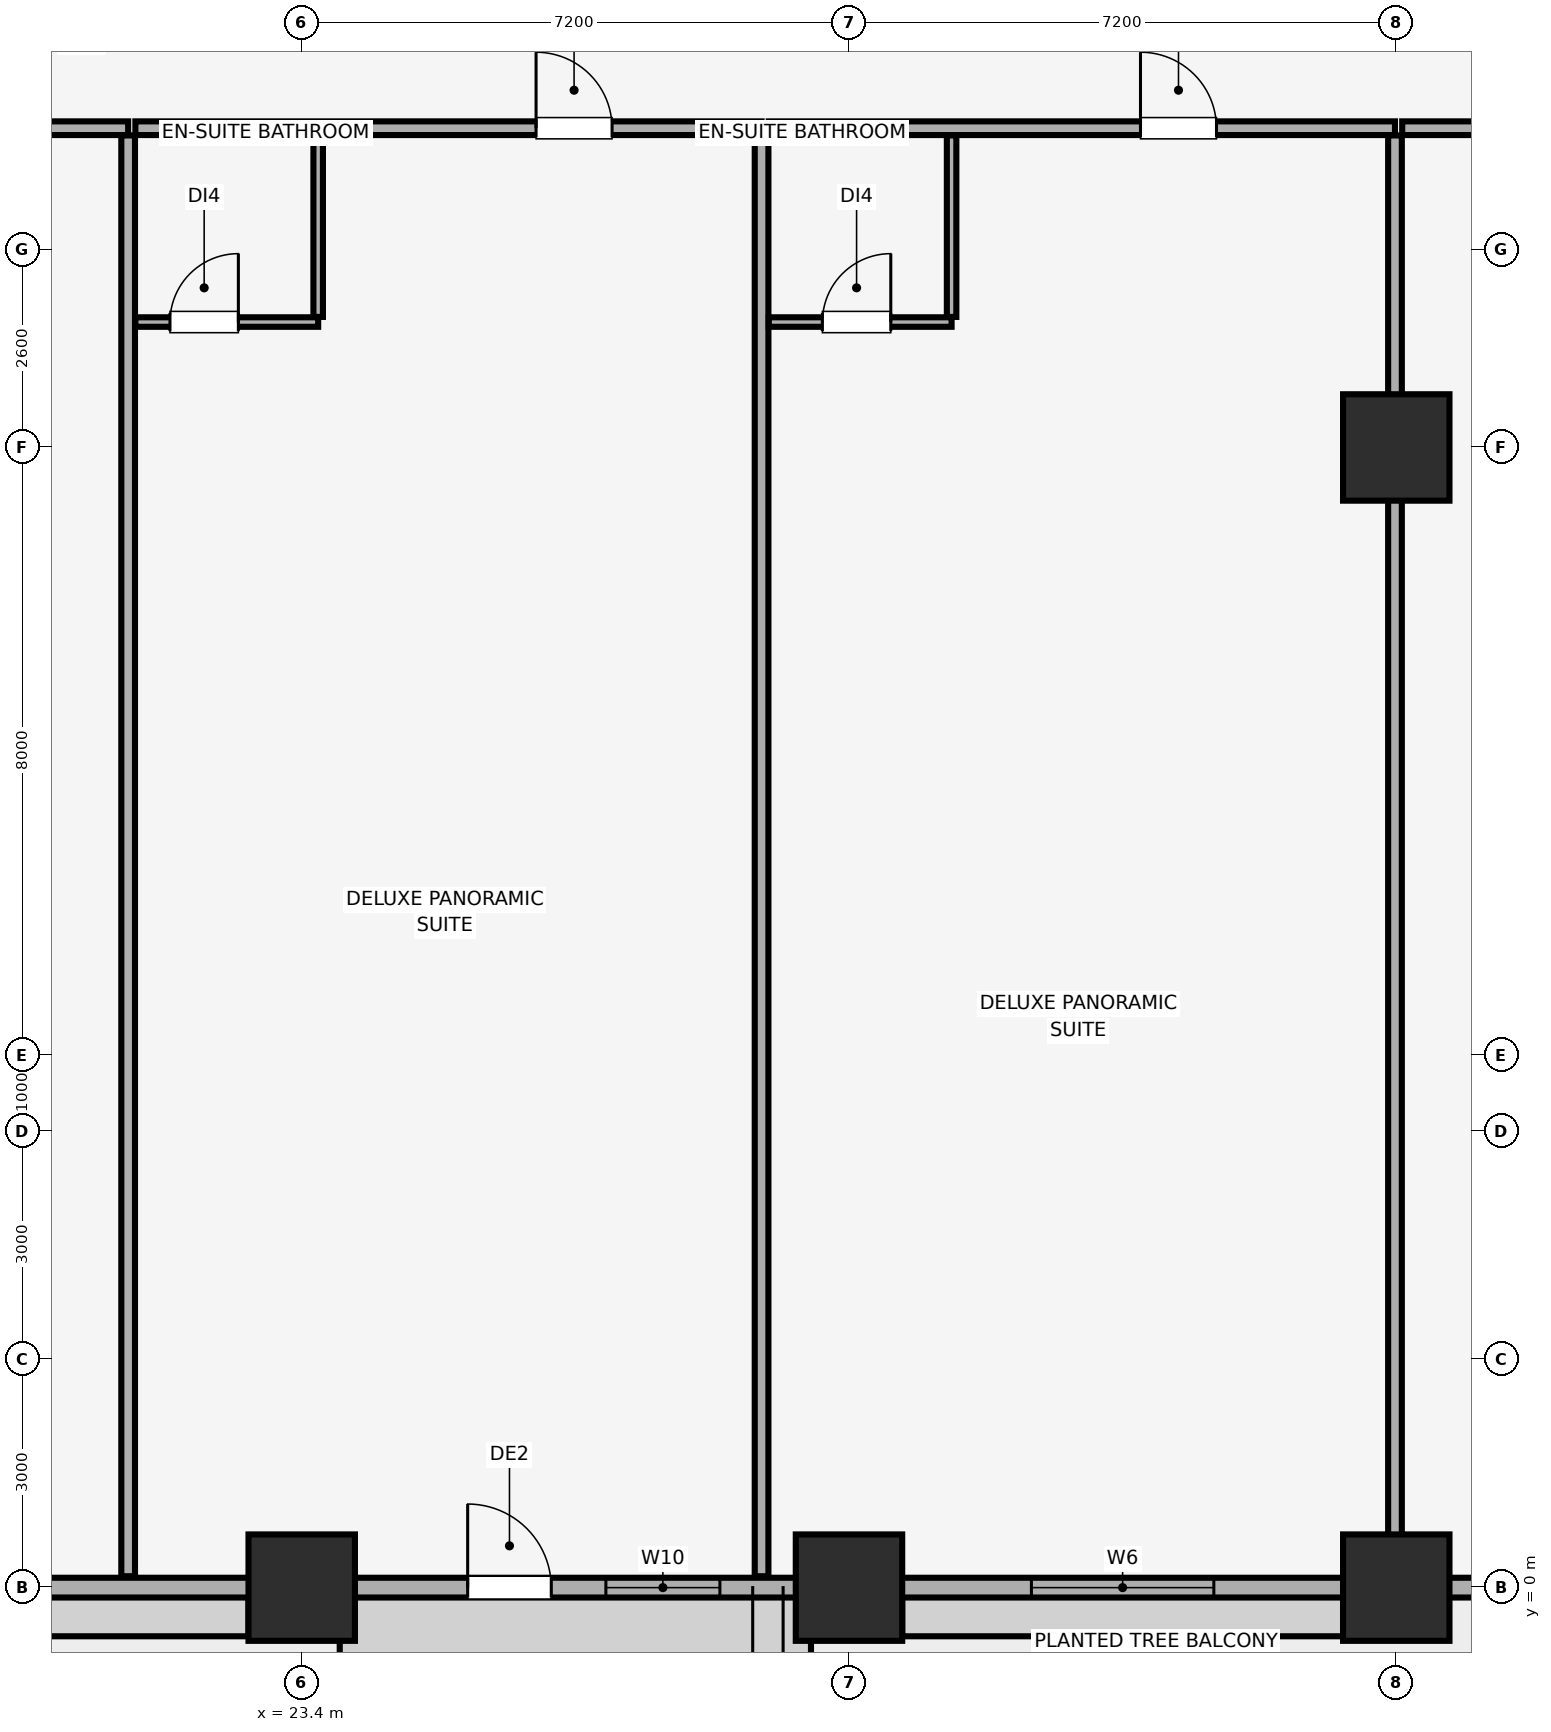
"""IFC4 building model, lengths in metres.
Left out: names, types, materials, properties, quantities, classifications, styles, units other than length and angle.
Written with IfcOpenShell. Run it as: python <this file> out.ifc"""

import sys

from ifc_helpers import new_model, si_unit, direction, frame, frame_2d, origin, origin_2d, place, context, subcontext, project, spatial, rectangle, extrude, element, fill, save


model = new_model("IFC4")
c1 = context("Model", 3, precision=1e-05, world=origin(), true_north=direction((0.0, 1.0)))
c2 = subcontext(c1, "Body", "Model", "MODEL_VIEW")
j1 = project(units=[si_unit("LENGTHUNIT", "METRE"), si_unit("PLANEANGLEUNIT", "RADIAN")], contexts=[c1])
p1 = place(None, origin())
s1 = spatial("IfcSite", under=j1, at=p1, CompositionType="ELEMENT")
p2 = place(p1, origin())
s2 = spatial("IfcBuilding", under=s1, at=p2, CompositionType="ELEMENT")
p3 = place(p2, frame((0.0, 0.0, 72.65)))
s3 = spatial("IfcBuildingStorey", under=s2, at=p3, CompositionType="ELEMENT", Elevation=72.65)
for number, where, z_axis, x_axis in (
    (1, (23.4, 0.0, 0.0), (0.0, 0.0, 1.0), (1.0, 0.0, 0.0)),
    (2, (30.6, 0.0, 0.0), (0.0, 0.0, 1.0), (1.0, 0.0, 0.0)),
    (3, (37.8, 0.0, 0.0), (0.0, 0.0, 1.0), (1.0, 0.0, 0.0)),
    (4, (37.8, 15.0, 0.0), (0.0, 0.0, 1.0), (1.0, 0.0, 0.0)),
):
    element("IfcColumn", number, at=place(p3, frame(where, z_axis=z_axis, x_axis=x_axis)), inside=s3, PredefinedType="COLUMN", context=c2, shape_type="SweptSolid", body=[
        extrude(rectangle(XDim=1.4, YDim=1.4, at=origin_2d()), origin(), (0.0, 0.0, 1.0), 3.51),
    ])
p4 = place(p3, frame((4.2, 0.0, 0.0), z_axis=(0.0, 0.0, 1.0), x_axis=(1.0, 0.0, 0.0)))
e5 = element("IfcWall", 5, at=p4, inside=s3, PredefinedType="SOLIDWALL", context=c2, shape_type="SweptSolid", body=[
    extrude(rectangle(XDim=75.6, YDim=0.26, at=frame_2d((37.8, 0.0))), origin(), (0.0, 0.0, 1.0), 2.56),
])
p5 = place(p4, frame((21.383, 0.0, 0.0)))
e6 = element("IfcOpeningElement", 6, at=p5, cuts=e5, PredefinedType="OPENING", context=c2, shape_type="SweptSolid", body=[
    extrude(rectangle(XDim=1.1, YDim=2.15, at=frame_2d((0.55, 1.075))), frame((0.0, 0.14, 0.0), z_axis=(0.0, -1.0, 0.0), x_axis=(1.0, 0.0, 0.0)), (0.0, 0.0, 1.0), 0.28),
])
p6 = place(p4, frame((37.25, 0.0, 0.0)))
e7 = element("IfcOpeningElement", 7, at=p6, cuts=e5, PredefinedType="OPENING", context=c2, shape_type="SweptSolid", body=[
    extrude(rectangle(XDim=1.1, YDim=2.15, at=frame_2d((0.55, 1.075))), frame((0.0, 0.14, 0.0), z_axis=(0.0, -1.0, 0.0), x_axis=(1.0, 0.0, 0.0)), (0.0, 0.0, 1.0), 0.28),
])
p7 = place(p4, frame((53.117, 0.0, 0.0)))
e8 = element("IfcOpeningElement", 8, at=p7, cuts=e5, PredefinedType="OPENING", context=c2, shape_type="SweptSolid", body=[
    extrude(rectangle(XDim=1.1, YDim=2.15, at=frame_2d((0.55, 1.075))), frame((0.0, 0.14, 0.0), z_axis=(0.0, -1.0, 0.0), x_axis=(1.0, 0.0, 0.0)), (0.0, 0.0, 1.0), 0.28),
])
p8 = place(p4, frame((1.035, 0.0, 0.85)))
e9 = element("IfcOpeningElement", 9, at=p8, cuts=e5, PredefinedType="OPENING", context=c2, shape_type="SweptSolid", body=[
    extrude(rectangle(XDim=2.4, YDim=1.5, at=frame_2d((1.2, 0.75))), frame((0.0, 0.14, 0.0), z_axis=(0.0, -1.0, 0.0), x_axis=(1.0, 0.0, 0.0)), (0.0, 0.0, 1.0), 0.28),
])
p9 = place(p4, frame((5.691, 0.0, 0.85)))
e10 = element("IfcOpeningElement", 10, at=p9, cuts=e5, PredefinedType="OPENING", context=c2, shape_type="SweptSolid", body=[
    extrude(rectangle(XDim=2.4, YDim=1.5, at=frame_2d((1.2, 0.75))), frame((0.0, 0.14, 0.0), z_axis=(0.0, -1.0, 0.0), x_axis=(1.0, 0.0, 0.0)), (0.0, 0.0, 1.0), 0.28),
])
p10 = place(p4, frame((9.342, 0.0, 0.85)))
e11 = element("IfcOpeningElement", 11, at=p10, cuts=e5, PredefinedType="OPENING", context=c2, shape_type="SweptSolid", body=[
    extrude(rectangle(XDim=1.5, YDim=1.4, at=frame_2d((0.75, 0.7))), frame((0.0, 0.14, 0.0), z_axis=(0.0, -1.0, 0.0), x_axis=(1.0, 0.0, 0.0)), (0.0, 0.0, 1.0), 0.28),
])
p11 = place(p4, frame((13.458, 0.0, 0.85)))
e12 = element("IfcOpeningElement", 12, at=p11, cuts=e5, PredefinedType="OPENING", context=c2, shape_type="SweptSolid", body=[
    extrude(rectangle(XDim=2.4, YDim=1.5, at=frame_2d((1.2, 0.75))), frame((0.0, 0.14, 0.0), z_axis=(0.0, -1.0, 0.0), x_axis=(1.0, 0.0, 0.0)), (0.0, 0.0, 1.0), 0.28),
])
p12 = place(p4, frame((23.202, 0.0, 0.85)))
e13 = element("IfcOpeningElement", 13, at=p12, cuts=e5, PredefinedType="OPENING", context=c2, shape_type="SweptSolid", body=[
    extrude(rectangle(XDim=1.5, YDim=1.4, at=frame_2d((0.75, 0.7))), frame((0.0, 0.14, 0.0), z_axis=(0.0, -1.0, 0.0), x_axis=(1.0, 0.0, 0.0)), (0.0, 0.0, 1.0), 0.28),
])
p13 = place(p4, frame((28.8, 0.0, 0.85)))
e14 = element("IfcOpeningElement", 14, at=p13, cuts=e5, PredefinedType="OPENING", context=c2, shape_type="SweptSolid", body=[
    extrude(rectangle(XDim=2.4, YDim=1.5, at=frame_2d((1.2, 0.75))), frame((0.0, 0.14, 0.0), z_axis=(0.0, -1.0, 0.0), x_axis=(1.0, 0.0, 0.0)), (0.0, 0.0, 1.0), 0.28),
])
p14 = place(p4, frame((34.79, 0.0, 0.85)))
e15 = element("IfcOpeningElement", 15, at=p14, cuts=e5, PredefinedType="OPENING", context=c2, shape_type="SweptSolid", body=[
    extrude(rectangle(XDim=1.5, YDim=1.4, at=frame_2d((0.75, 0.7))), frame((0.0, 0.14, 0.0), z_axis=(0.0, -1.0, 0.0), x_axis=(1.0, 0.0, 0.0)), (0.0, 0.0, 1.0), 0.28),
])
p15 = place(p4, frame((39.31, 0.0, 0.85)))
e16 = element("IfcOpeningElement", 16, at=p15, cuts=e5, PredefinedType="OPENING", context=c2, shape_type="SweptSolid", body=[
    extrude(rectangle(XDim=1.5, YDim=1.4, at=frame_2d((0.75, 0.7))), frame((0.0, 0.14, 0.0), z_axis=(0.0, -1.0, 0.0), x_axis=(1.0, 0.0, 0.0)), (0.0, 0.0, 1.0), 0.28),
])
p16 = place(p4, frame((44.4, 0.0, 0.85)))
e17 = element("IfcOpeningElement", 17, at=p16, cuts=e5, PredefinedType="OPENING", context=c2, shape_type="SweptSolid", body=[
    extrude(rectangle(XDim=2.4, YDim=1.5, at=frame_2d((1.2, 0.75))), frame((0.0, 0.14, 0.0), z_axis=(0.0, -1.0, 0.0), x_axis=(1.0, 0.0, 0.0)), (0.0, 0.0, 1.0), 0.28),
])
p17 = place(p4, frame((50.848, 0.0, 0.85)))
e18 = element("IfcOpeningElement", 18, at=p17, cuts=e5, PredefinedType="OPENING", context=c2, shape_type="SweptSolid", body=[
    extrude(rectangle(XDim=1.5, YDim=1.4, at=frame_2d((0.75, 0.7))), frame((0.0, 0.14, 0.0), z_axis=(0.0, -1.0, 0.0), x_axis=(1.0, 0.0, 0.0)), (0.0, 0.0, 1.0), 0.28),
])
p18 = place(p4, frame((59.691, 0.0, 0.85)))
e19 = element("IfcOpeningElement", 19, at=p18, cuts=e5, PredefinedType="OPENING", context=c2, shape_type="SweptSolid", body=[
    extrude(rectangle(XDim=2.4, YDim=1.5, at=frame_2d((1.2, 0.75))), frame((0.0, 0.14, 0.0), z_axis=(0.0, -1.0, 0.0), x_axis=(1.0, 0.0, 0.0)), (0.0, 0.0, 1.0), 0.28),
])
p19 = place(p4, frame((64.708, 0.0, 0.85)))
e20 = element("IfcOpeningElement", 20, at=p19, cuts=e5, PredefinedType="OPENING", context=c2, shape_type="SweptSolid", body=[
    extrude(rectangle(XDim=1.5, YDim=1.4, at=frame_2d((0.75, 0.7))), frame((0.0, 0.14, 0.0), z_axis=(0.0, -1.0, 0.0), x_axis=(1.0, 0.0, 0.0)), (0.0, 0.0, 1.0), 0.28),
])
p20 = place(p4, frame((67.458, 0.0, 0.85)))
e21 = element("IfcOpeningElement", 21, at=p20, cuts=e5, PredefinedType="OPENING", context=c2, shape_type="SweptSolid", body=[
    extrude(rectangle(XDim=2.4, YDim=1.5, at=frame_2d((1.2, 0.75))), frame((0.0, 0.14, 0.0), z_axis=(0.0, -1.0, 0.0), x_axis=(1.0, 0.0, 0.0)), (0.0, 0.0, 1.0), 0.28),
])
p21 = place(p4, frame((72.165, 0.0, 0.85)))
e22 = element("IfcOpeningElement", 22, at=p21, cuts=e5, PredefinedType="OPENING", context=c2, shape_type="SweptSolid", body=[
    extrude(rectangle(XDim=2.4, YDim=1.5, at=frame_2d((1.2, 0.75))), frame((0.0, 0.14, 0.0), z_axis=(0.0, -1.0, 0.0), x_axis=(1.0, 0.0, 0.0)), (0.0, 0.0, 1.0), 0.28),
])
p22 = place(p3, frame((12.878, 19.2, 0.0), z_axis=(0.0, 0.0, 1.0), x_axis=(1.0, 0.0, 0.0)))
e23 = element("IfcWall", 23, at=p22, inside=s3, PredefinedType="PARTITIONING", context=c2, shape_type="SweptSolid", body=[
    extrude(rectangle(XDim=8.238, YDim=0.18, at=frame_2d((4.119, 0.0))), origin(), (0.0, 0.0, 1.0), 3.51),
])
p23 = place(p22, frame((5.67, 0.0, 0.0)))
e24 = element("IfcOpeningElement", 24, at=p23, cuts=e23, PredefinedType="OPENING", context=c2, shape_type="SweptSolid", body=[
    extrude(rectangle(XDim=1.0, YDim=2.15, at=frame_2d((0.5, 1.075))), frame((0.0, 0.1, 0.0), z_axis=(0.0, -1.0, 0.0), x_axis=(1.0, 0.0, 0.0)), (0.0, 0.0, 1.0), 0.2),
])
p24 = place(p3, frame((21.117, 0.15, 0.0), z_axis=(0.0, 0.0, 1.0), x_axis=(0.0, 1.0, 0.0)))
e25 = element("IfcWall", 25, at=p24, inside=s3, PredefinedType="PARTITIONING", context=c2, shape_type="SweptSolid", body=[
    extrude(rectangle(XDim=18.955, YDim=0.18, at=frame_2d((9.478, 0.0))), origin(), (0.0, 0.0, 1.0), 3.51),
])
p25 = place(p3, frame((21.212, 19.2, 0.0), z_axis=(0.0, 0.0, 1.0), x_axis=(1.0, 0.0, 0.0)))
e26 = element("IfcWall", 26, at=p25, inside=s3, PredefinedType="PARTITIONING", context=c2, shape_type="SweptSolid", body=[
    extrude(rectangle(XDim=8.238, YDim=0.18, at=frame_2d((4.119, 0.0))), origin(), (0.0, 0.0, 1.0), 3.51),
])
p26 = place(p25, frame((5.271, 0.0, 0.0)))
e27 = element("IfcOpeningElement", 27, at=p26, cuts=e26, PredefinedType="OPENING", context=c2, shape_type="SweptSolid", body=[
    extrude(rectangle(XDim=1.0, YDim=2.15, at=frame_2d((0.5, 1.075))), frame((0.0, 0.1, 0.0), z_axis=(0.0, -1.0, 0.0), x_axis=(1.0, 0.0, 0.0)), (0.0, 0.0, 1.0), 0.2),
])
p27 = place(p3, frame((29.45, 0.15, 0.0), z_axis=(0.0, 0.0, 1.0), x_axis=(0.0, 1.0, 0.0)))
e28 = element("IfcWall", 28, at=p27, inside=s3, PredefinedType="PARTITIONING", context=c2, shape_type="SweptSolid", body=[
    extrude(rectangle(XDim=18.955, YDim=0.18, at=frame_2d((9.478, 0.0))), origin(), (0.0, 0.0, 1.0), 3.51),
])
p28 = place(p3, frame((21.212, 16.65, 0.0), z_axis=(0.0, 0.0, 1.0), x_axis=(1.0, 0.0, 0.0)))
e29 = element("IfcWall", 29, at=p28, inside=s3, PredefinedType="PARTITIONING", context=c2, shape_type="SweptSolid", body=[
    extrude(rectangle(XDim=2.405, YDim=0.125, at=frame_2d((1.203, 0.0))), origin(), (0.0, 0.0, 1.0), 3.51),
])
p29 = place(p28, frame((0.455, 0.0, 0.0)))
e30 = element("IfcOpeningElement", 30, at=p29, cuts=e29, PredefinedType="OPENING", context=c2, shape_type="SweptSolid", body=[
    extrude(rectangle(XDim=0.9, YDim=2.1, at=frame_2d((0.45, 1.05))), frame((0.0, 0.073, 0.0), z_axis=(0.0, -1.0, 0.0), x_axis=(1.0, 0.0, 0.0)), (0.0, 0.0, 1.0), 0.145),
])
p30 = place(p3, frame((23.617, 16.718, 0.0), z_axis=(0.0, 0.0, 1.0), x_axis=(0.0, 1.0, 0.0)))
e31 = element("IfcWall", 31, at=p30, inside=s3, PredefinedType="PARTITIONING", context=c2, shape_type="SweptSolid", body=[
    extrude(rectangle(XDim=2.387, YDim=0.125, at=frame_2d((1.194, 0.0))), origin(), (0.0, 0.0, 1.0), 2.977),
])
p31 = place(p3, frame((29.545, 19.2, 0.0), z_axis=(0.0, 0.0, 1.0), x_axis=(1.0, 0.0, 0.0)))
e32 = element("IfcWall", 32, at=p31, inside=s3, PredefinedType="PARTITIONING", context=c2, shape_type="SweptSolid", body=[
    extrude(rectangle(XDim=8.238, YDim=0.18, at=frame_2d((4.119, 0.0))), origin(), (0.0, 0.0, 1.0), 3.51),
])
p32 = place(p31, frame((4.89, 0.0, 0.0)))
e33 = element("IfcOpeningElement", 33, at=p32, cuts=e32, PredefinedType="OPENING", context=c2, shape_type="SweptSolid", body=[
    extrude(rectangle(XDim=1.0, YDim=2.15, at=frame_2d((0.5, 1.075))), frame((0.0, 0.1, 0.0), z_axis=(0.0, -1.0, 0.0), x_axis=(1.0, 0.0, 0.0)), (0.0, 0.0, 1.0), 0.2),
])
p33 = place(p3, frame((37.783, 0.15, 0.0), z_axis=(0.0, 0.0, 1.0), x_axis=(0.0, 1.0, 0.0)))
e34 = element("IfcWall", 34, at=p33, inside=s3, PredefinedType="PARTITIONING", context=c2, shape_type="SweptSolid", body=[
    extrude(rectangle(XDim=18.955, YDim=0.18, at=frame_2d((9.478, 0.0))), origin(), (0.0, 0.0, 1.0), 2.898),
])
p34 = place(p3, frame((29.545, 16.65, 0.0), z_axis=(0.0, 0.0, 1.0), x_axis=(1.0, 0.0, 0.0)))
e35 = element("IfcWall", 35, at=p34, inside=s3, PredefinedType="PARTITIONING", context=c2, shape_type="SweptSolid", body=[
    extrude(rectangle(XDim=2.405, YDim=0.125, at=frame_2d((1.203, 0.0))), origin(), (0.0, 0.0, 1.0), 3.51),
])
p35 = place(p34, frame((0.705, 0.0, 0.0)))
e36 = element("IfcOpeningElement", 36, at=p35, cuts=e35, PredefinedType="OPENING", context=c2, shape_type="SweptSolid", body=[
    extrude(rectangle(XDim=0.9, YDim=2.1, at=frame_2d((0.45, 1.05))), frame((0.0, 0.073, 0.0), z_axis=(0.0, -1.0, 0.0), x_axis=(1.0, 0.0, 0.0)), (0.0, 0.0, 1.0), 0.145),
])
p36 = place(p3, frame((31.95, 16.718, 0.0), z_axis=(0.0, 0.0, 1.0), x_axis=(0.0, 1.0, 0.0)))
e37 = element("IfcWall", 37, at=p36, inside=s3, PredefinedType="PARTITIONING", context=c2, shape_type="SweptSolid", body=[
    extrude(rectangle(XDim=2.387, YDim=0.125, at=frame_2d((1.194, 0.0))), origin(), (0.0, 0.0, 1.0), 3.51),
])
p37 = place(p3, frame((37.878, 19.2, 0.0), z_axis=(0.0, 0.0, 1.0), x_axis=(1.0, 0.0, 0.0)))
e38 = element("IfcWall", 38, at=p37, inside=s3, PredefinedType="PARTITIONING", context=c2, shape_type="SweptSolid", body=[
    extrude(rectangle(XDim=8.238, YDim=0.18, at=frame_2d((4.119, 0.0))), origin(), (0.0, 0.0, 1.0), 3.51),
])
p38 = place(p37, frame((2.27, 0.0, 0.0)))
e39 = element("IfcOpeningElement", 39, at=p38, cuts=e38, PredefinedType="OPENING", context=c2, shape_type="SweptSolid", body=[
    extrude(rectangle(XDim=1.0, YDim=2.15, at=frame_2d((0.5, 1.075))), frame((0.0, 0.1, 0.0), z_axis=(0.0, -1.0, 0.0), x_axis=(1.0, 0.0, 0.0)), (0.0, 0.0, 1.0), 0.2),
])
p39 = place(p5, origin())
e40 = element("IfcDoor", 40, at=p39, inside=s3, OperationType="SINGLE_SWING_LEFT", PredefinedType="DOOR", context=c2, shape_type="SweptSolid", body=[
    extrude(rectangle(XDim=1.1, YDim=2.15, at=frame_2d((0.55, 1.075))), frame((0.0, 0.025, 0.0), z_axis=(0.0, -1.0, 0.0), x_axis=(1.0, 0.0, 0.0)), (0.0, 0.0, 1.0), 0.05),
])
fill(e6, e40)
p40 = place(p12, origin())
e41 = element("IfcWindow", 41, at=p40, inside=s3, PartitioningType="SINGLE_PANEL", PredefinedType="WINDOW", context=c2, shape_type="SweptSolid", body=[
    extrude(rectangle(XDim=1.5, YDim=1.4, at=frame_2d((0.75, 0.7))), frame((0.0, 0.03, 0.0), z_axis=(0.0, -1.0, 0.0), x_axis=(1.0, 0.0, 0.0)), (0.0, 0.0, 1.0), 0.06),
])
fill(e13, e41)
p41 = place(p13, origin())
e42 = element("IfcWindow", 42, at=p41, inside=s3, PartitioningType="SINGLE_PANEL", PredefinedType="WINDOW", context=c2, shape_type="SweptSolid", body=[
    extrude(rectangle(XDim=2.4, YDim=1.5, at=frame_2d((1.2, 0.75))), frame((0.0, 0.03, 0.0), z_axis=(0.0, -1.0, 0.0), x_axis=(1.0, 0.0, 0.0)), (0.0, 0.0, 1.0), 0.06),
])
fill(e14, e42)
p42 = place(p26, origin())
e43 = element("IfcDoor", 43, at=p42, inside=s3, OperationType="SINGLE_SWING_LEFT", PredefinedType="DOOR", context=c2, shape_type="SweptSolid", body=[
    extrude(rectangle(XDim=1.0, YDim=2.15, at=frame_2d((0.5, 1.075))), frame((0.0, 0.025, 0.0), z_axis=(0.0, -1.0, 0.0), x_axis=(1.0, 0.0, 0.0)), (0.0, 0.0, 1.0), 0.05),
])
fill(e27, e43)
p43 = place(p29, origin())
e44 = element("IfcDoor", 44, at=p43, inside=s3, OperationType="SINGLE_SWING_RIGHT", PredefinedType="DOOR", context=c2, shape_type="SweptSolid", body=[
    extrude(rectangle(XDim=0.9, YDim=2.1, at=frame_2d((0.45, 1.05))), frame((0.0, 0.025, 0.0), z_axis=(0.0, -1.0, 0.0), x_axis=(1.0, 0.0, 0.0)), (0.0, 0.0, 1.0), 0.05),
])
fill(e30, e44)
p44 = place(p32, origin())
e45 = element("IfcDoor", 45, at=p44, inside=s3, OperationType="SINGLE_SWING_LEFT", PredefinedType="DOOR", context=c2, shape_type="SweptSolid", body=[
    extrude(rectangle(XDim=1.0, YDim=2.15, at=frame_2d((0.5, 1.075))), frame((0.0, 0.025, 0.0), z_axis=(0.0, -1.0, 0.0), x_axis=(1.0, 0.0, 0.0)), (0.0, 0.0, 1.0), 0.05),
])
fill(e33, e45)
p45 = place(p35, origin())
e46 = element("IfcDoor", 46, at=p45, inside=s3, OperationType="SINGLE_SWING_RIGHT", PredefinedType="DOOR", context=c2, shape_type="SweptSolid", body=[
    extrude(rectangle(XDim=0.9, YDim=2.1, at=frame_2d((0.45, 1.05))), frame((0.0, 0.025, 0.0), z_axis=(0.0, -1.0, 0.0), x_axis=(1.0, 0.0, 0.0)), (0.0, 0.0, 1.0), 0.05),
])
fill(e36, e46)
save(model, sys.argv[1])
